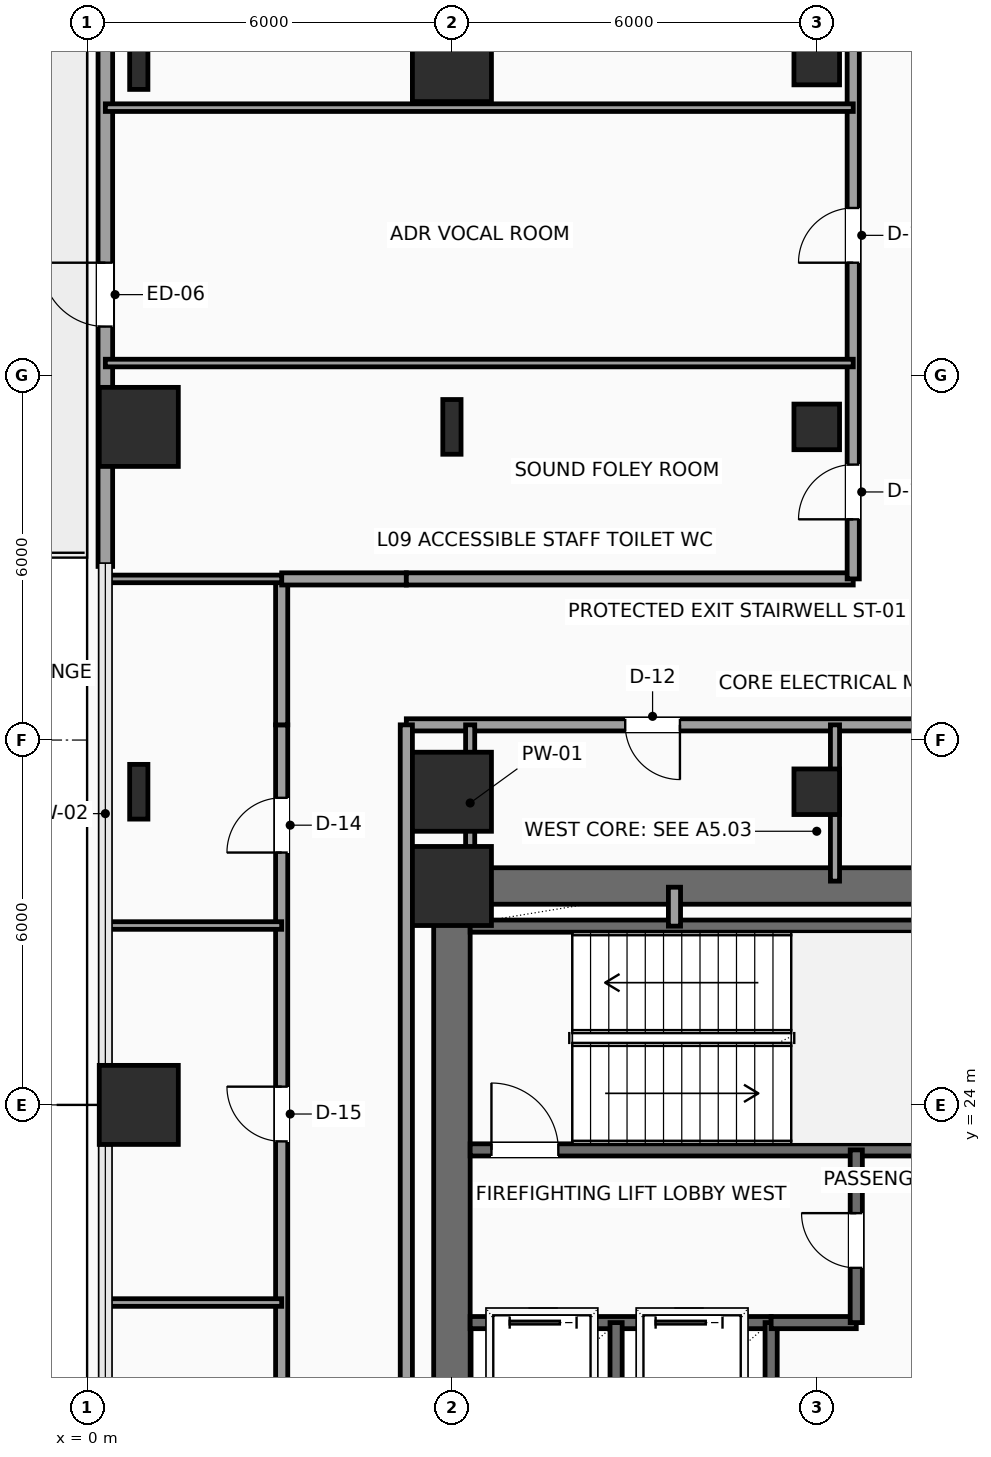
"""IFC4 building model, lengths in metres.
Left out: names, types, materials, properties, quantities, classifications, styles, units other than length and angle.
Written with IfcOpenShell. Run it as: python <this file> out.ifc"""

import sys

from ifc_helpers import new_model, si_unit, direction, frame, frame_2d, origin, origin_2d, place, context, subcontext, project, spatial, rectangle, hollow_rectangle, i_section, extrude, element, fill, save


model = new_model("IFC4")
c1 = context("Model", 3, precision=1e-05, world=origin(), true_north=direction((0.0, 1.0)))
c2 = subcontext(c1, "Body", "Model", "MODEL_VIEW")
j1 = project(units=[si_unit("LENGTHUNIT", "METRE"), si_unit("PLANEANGLEUNIT", "RADIAN")], contexts=[c1])
p1 = place(None, origin())
s1 = spatial("IfcSite", under=j1, at=p1, CompositionType="ELEMENT")
p2 = place(p1, origin())
s2 = spatial("IfcBuilding", under=s1, at=p2, CompositionType="ELEMENT")
p3 = place(p2, frame((0.0, 0.0, 44.1)))
s3 = spatial("IfcBuildingStorey", under=s2, at=p3, CompositionType="ELEMENT", Elevation=44.1)
for number, where, z_axis, x_axis in (
    (1, (6.0, 27.6, 0.0), (0.0, 0.0, 1.0), (1.0, 0.0, 0.0)),
    (2, (0.85, 24.0, 0.0), (0.0, 0.0, 1.0), (1.0, 0.0, 0.0)),
):
    element("IfcColumn", number, at=place(p3, frame(where, z_axis=z_axis, x_axis=x_axis)), inside=s3, PredefinedType="COLUMN", context=c2, shape_type="SweptSolid", body=[
        extrude(rectangle(XDim=1.3, YDim=1.3, at=origin_2d()), origin(), (0.0, 0.0, 1.0), 3.9),
    ])
p4 = place(p3, frame((0.85, 29.15, 0.0), z_axis=(0.0, 0.0, 1.0), x_axis=(1.0, 0.0, 0.0)))
e3 = element("IfcColumn", 3, at=p4, inside=s3, PredefinedType="COLUMN", context=c2, shape_type="SweptSolid", body=[
    extrude(i_section(OverallWidth=0.3, OverallDepth=0.9, WebThickness=0.019, FlangeThickness=0.035, FilletRadius=0.03, at=origin_2d()), origin(), (0.0, 0.0, 1.0), 3.9),
])
p5 = place(p3, frame((0.85, 35.15, 0.0), z_axis=(0.0, 0.0, 1.0), x_axis=(1.0, 0.0, 0.0)))
e4 = element("IfcColumn", 4, at=p5, inside=s3, PredefinedType="COLUMN", context=c2, shape_type="SweptSolid", body=[
    extrude(rectangle(XDim=1.3, YDim=1.3, at=origin_2d()), origin(), (0.0, 0.0, 1.0), 3.9),
])
p6 = place(p3, frame((0.85, 41.15, 0.0), z_axis=(0.0, 0.0, 1.0), x_axis=(1.0, 0.0, 0.0)))
e5 = element("IfcColumn", 5, at=p6, inside=s3, PredefinedType="COLUMN", context=c2, shape_type="SweptSolid", body=[
    extrude(i_section(OverallWidth=0.3, OverallDepth=0.9, WebThickness=0.019, FlangeThickness=0.035, FilletRadius=0.03, at=origin_2d()), origin(), (0.0, 0.0, 1.0), 3.9),
])
p7 = place(p3, frame((6.0, 29.15, 0.0), z_axis=(0.0, 0.0, 1.0), x_axis=(1.0, 0.0, 0.0)))
e6 = element("IfcColumn", 6, at=p7, inside=s3, PredefinedType="COLUMN", context=c2, shape_type="SweptSolid", body=[
    extrude(rectangle(XDim=1.3, YDim=1.3, at=origin_2d()), origin(), (0.0, 0.0, 1.0), 3.9),
])
p8 = place(p3, frame((6.0, 35.15, 0.0), z_axis=(0.0, 0.0, 1.0), x_axis=(1.0, 0.0, 0.0)))
e7 = element("IfcColumn", 7, at=p8, inside=s3, PredefinedType="COLUMN", context=c2, shape_type="SweptSolid", body=[
    extrude(i_section(OverallWidth=0.3, OverallDepth=0.9, WebThickness=0.019, FlangeThickness=0.035, FilletRadius=0.03, at=origin_2d()), origin(), (0.0, 0.0, 1.0), 3.9),
])
p9 = place(p3, frame((6.0, 41.15, 0.0), z_axis=(0.0, 0.0, 1.0), x_axis=(1.0, 0.0, 0.0)))
e8 = element("IfcColumn", 8, at=p9, inside=s3, PredefinedType="COLUMN", context=c2, shape_type="SweptSolid", body=[
    extrude(rectangle(XDim=1.3, YDim=1.3, at=origin_2d()), origin(), (0.0, 0.0, 1.0), 3.9),
])
for number, where, z_axis, x_axis in (
    (9, (12.0, 29.15, 0.0), (0.0, 0.0, 1.0), (1.0, 0.0, 0.0)),
    (10, (12.0, 35.15, 0.0), (0.0, 0.0, 1.0), (1.0, 0.0, 0.0)),
    (11, (12.0, 41.15, 0.0), (0.0, 0.0, 1.0), (1.0, 0.0, 0.0)),
):
    element("IfcColumn", number, at=place(p3, frame(where, z_axis=z_axis, x_axis=x_axis)), inside=s3, PredefinedType="COLUMN", context=c2, shape_type="SweptSolid", body=[
        extrude(hollow_rectangle(XDim=0.75, YDim=0.75, WallThickness=0.035, InnerFilletRadius=0.035, OuterFilletRadius=0.05, at=origin_2d()), origin(), (0.0, 0.0, 1.0), 3.9),
    ])
p10 = place(p3, frame((0.3, 32.855, 0.0), z_axis=(0.0, 0.0, 1.0), x_axis=(0.0, 1.0, 0.0)))
e12 = element("IfcWall", 12, at=p10, inside=s3, PredefinedType="SOLIDWALL", context=c2, shape_type="SweptSolid", body=[
    extrude(rectangle(XDim=9.29, YDim=0.24, at=frame_2d((4.645, 0.0))), origin(), (0.0, 0.0, 1.0), 3.65),
])
p11 = place(p10, frame((3.945, 0.0, 0.0)))
e13 = element("IfcOpeningElement", 13, at=p11, cuts=e12, PredefinedType="OPENING", context=c2, shape_type="SweptSolid", body=[
    extrude(rectangle(XDim=1.05, YDim=2.2, at=frame_2d((0.525, 1.1))), frame((0.0, 0.13, 0.0), z_axis=(0.0, -1.0, 0.0), x_axis=(1.0, 0.0, 0.0)), (0.0, 0.0, 1.0), 0.26),
])
p12 = place(p3, frame((6.0, 27.6, 0.0), z_axis=(0.0, 0.0, 1.0), x_axis=(1.0, 0.0, 0.0)))
e14 = element("IfcWall", 14, at=p12, inside=s3, PredefinedType="SHEAR", context=c2, shape_type="SweptSolid", body=[
    extrude(rectangle(XDim=12.0, YDim=0.6, at=frame_2d((6.0, 0.0))), origin(), (0.0, 0.0, 1.0), 3.65),
])
p13 = place(p12, frame((10.2, 0.0, 0.0)))
e15 = element("IfcOpeningElement", 15, at=p13, cuts=e14, PredefinedType="OPENING", context=c2, shape_type="SweptSolid", body=[
    extrude(rectangle(XDim=0.9, YDim=2.15, at=frame_2d((0.45, 1.075))), frame((0.0, 0.31, 0.0), z_axis=(0.0, -1.0, 0.0), x_axis=(1.0, 0.0, 0.0)), (0.0, 0.0, 1.0), 0.62),
])
p14 = place(p3, frame((6.0, 18.0, 0.0), z_axis=(0.0, 0.0, 1.0), x_axis=(0.0, 1.0, 0.0)))
e16 = element("IfcWall", 16, at=p14, inside=s3, PredefinedType="SHEAR", context=c2, shape_type="SweptSolid", body=[
    extrude(rectangle(XDim=9.6, YDim=0.6, at=frame_2d((4.8, 0.0))), origin(), (0.0, 0.0, 1.0), 3.65),
])
p15 = place(p3, frame((6.3, 23.26, 0.0), z_axis=(0.0, 0.0, 1.0), x_axis=(1.0, 0.0, 0.0)))
e17 = element("IfcWall", 17, at=p15, inside=s3, PredefinedType="SHEAR", context=c2, shape_type="SweptSolid", body=[
    extrude(rectangle(XDim=8.88, YDim=0.2, at=frame_2d((4.44, 0.0))), origin(), (0.0, 0.0, 1.0), 3.65),
])
p16 = place(p15, frame((0.35, 0.0, 0.0)))
e18 = element("IfcOpeningElement", 18, at=p16, cuts=e17, PredefinedType="OPENING", context=c2, shape_type="SweptSolid", body=[
    extrude(rectangle(XDim=1.1, YDim=2.2, at=frame_2d((0.55, 1.1))), frame((0.0, 0.11, 0.0), z_axis=(0.0, -1.0, 0.0), x_axis=(1.0, 0.0, 0.0)), (0.0, 0.0, 1.0), 0.22),
])
p17 = place(p3, frame((6.3, 26.94, 0.0), z_axis=(0.0, 0.0, 1.0), x_axis=(1.0, 0.0, 0.0)))
e19 = element("IfcWall", 19, at=p17, inside=s3, PredefinedType="SHEAR", context=c2, shape_type="SweptSolid", body=[
    extrude(rectangle(XDim=8.88, YDim=0.2, at=frame_2d((4.44, 0.0))), origin(), (0.0, 0.0, 1.0), 3.65),
])
p18 = place(p3, frame((6.3, 20.42, 0.0), z_axis=(0.0, 0.0, 1.0), x_axis=(1.0, 0.0, 0.0)))
e20 = element("IfcWall", 20, at=p18, inside=s3, PredefinedType="SHEAR", context=c2, shape_type="SweptSolid", body=[
    extrude(rectangle(XDim=4.95, YDim=0.2, at=frame_2d((2.475, 0.0))), origin(), (0.0, 0.0, 1.0), 3.65),
])
p19 = place(p18, frame((0.65, 0.0, 0.0)))
e21 = element("IfcOpeningElement", 21, at=p19, cuts=e20, PredefinedType="OPENING", context=c2, shape_type="SweptSolid", body=[
    extrude(rectangle(XDim=1.1, YDim=2.2, at=frame_2d((0.55, 1.1))), frame((0.0, 0.11, 0.0), z_axis=(0.0, -1.0, 0.0), x_axis=(1.0, 0.0, 0.0)), (0.0, 0.0, 1.0), 0.22),
])
p20 = place(p18, frame((3.05, 0.0, 0.0)))
e22 = element("IfcOpeningElement", 22, at=p20, cuts=e20, PredefinedType="OPENING", context=c2, shape_type="SweptSolid", body=[
    extrude(rectangle(XDim=1.1, YDim=2.2, at=frame_2d((0.55, 1.1))), frame((0.0, 0.11, 0.0), z_axis=(0.0, -1.0, 0.0), x_axis=(1.0, 0.0, 0.0)), (0.0, 0.0, 1.0), 0.22),
])
for number, where, z_axis, x_axis in (
    (23, (8.7, 18.25, 0.0), (0.0, 0.0, 1.0), (0.0, 1.0, 0.0)),
    (24, (11.25, 18.25, 0.0), (0.0, 0.0, 1.0), (0.0, 1.0, 0.0)),
):
    element("IfcWall", number, at=place(p3, frame(where, z_axis=z_axis, x_axis=x_axis)), inside=s3, PredefinedType="SHEAR", context=c2, shape_type="SweptSolid", body=[
        extrude(rectangle(XDim=2.17, YDim=0.2, at=frame_2d((1.085, 0.0))), origin(), (0.0, 0.0, 1.0), 3.65),
    ])
p21 = place(p3, frame((11.25, 20.42, 0.0), z_axis=(0.0, 0.0, 1.0), x_axis=(1.0, 0.0, 0.0)))
e25 = element("IfcWall", 25, at=p21, inside=s3, PredefinedType="SHEAR", context=c2, shape_type="SweptSolid", body=[
    extrude(rectangle(XDim=1.4, YDim=0.2, at=frame_2d((0.7, 0.0))), origin(), (0.0, 0.0, 1.0), 3.65),
])
p22 = place(p3, frame((12.65, 20.42, 0.0), z_axis=(0.0, 0.0, 1.0), x_axis=(0.0, 1.0, 0.0)))
e26 = element("IfcWall", 26, at=p22, inside=s3, PredefinedType="SHEAR", context=c2, shape_type="SweptSolid", body=[
    extrude(rectangle(XDim=2.84, YDim=0.2, at=frame_2d((1.42, 0.0))), origin(), (0.0, 0.0, 1.0), 3.65),
])
p23 = place(p22, frame((0.9, 0.0, 0.0)))
e27 = element("IfcOpeningElement", 27, at=p23, cuts=e26, PredefinedType="OPENING", context=c2, shape_type="SweptSolid", body=[
    extrude(rectangle(XDim=0.9, YDim=2.15, at=frame_2d((0.45, 1.075))), frame((0.0, 0.11, 0.0), z_axis=(0.0, -1.0, 0.0), x_axis=(1.0, 0.0, 0.0)), (0.0, 0.0, 1.0), 0.22),
])
p24 = place(p3, frame((9.66, 26.94, 0.0), z_axis=(0.0, 0.0, 1.0), x_axis=(0.0, 1.0, 0.0)))
e28 = element("IfcWall", 28, at=p24, inside=s3, PredefinedType="SOLIDWALL", context=c2, shape_type="SweptSolid", body=[
    extrude(rectangle(XDim=0.64, YDim=0.2, at=frame_2d((0.32, 0.0))), origin(), (0.0, 0.0, 1.0), 3.65),
])
p25 = place(p3, frame((3.2, 14.55, 0.0), z_axis=(0.0, 0.0, 1.0), x_axis=(0.0, 1.0, 0.0)))
e29 = element("IfcWall", 29, at=p25, inside=s3, PredefinedType="PARTITIONING", context=c2, shape_type="SweptSolid", body=[
    extrude(rectangle(XDim=15.7, YDim=0.2, at=frame_2d((7.85, 0.0))), origin(), (0.0, 0.0, 1.0), 3.65),
])
p26 = place(p25, frame((2.65, 0.0, 0.0)))
e30 = element("IfcOpeningElement", 30, at=p26, cuts=e29, PredefinedType="OPENING", context=c2, shape_type="SweptSolid", body=[
    extrude(rectangle(XDim=0.9, YDim=2.1, at=frame_2d((0.45, 1.05))), frame((0.0, 0.11, 0.0), z_axis=(0.0, -1.0, 0.0), x_axis=(1.0, 0.0, 0.0)), (0.0, 0.0, 1.0), 0.22),
])
p27 = place(p25, frame((8.85, 0.0, 0.0)))
e31 = element("IfcOpeningElement", 31, at=p27, cuts=e29, PredefinedType="OPENING", context=c2, shape_type="SweptSolid", body=[
    extrude(rectangle(XDim=0.9, YDim=2.1, at=frame_2d((0.45, 1.05))), frame((0.0, 0.11, 0.0), z_axis=(0.0, -1.0, 0.0), x_axis=(1.0, 0.0, 0.0)), (0.0, 0.0, 1.0), 0.22),
])
p28 = place(p25, frame((13.6, 0.0, 0.0)))
e32 = element("IfcOpeningElement", 32, at=p28, cuts=e29, PredefinedType="OPENING", context=c2, shape_type="SweptSolid", body=[
    extrude(rectangle(XDim=0.9, YDim=2.1, at=frame_2d((0.45, 1.05))), frame((0.0, 0.11, 0.0), z_axis=(0.0, -1.0, 0.0), x_axis=(1.0, 0.0, 0.0)), (0.0, 0.0, 1.0), 0.22),
])
p29 = place(p3, frame((3.2, 30.25, 0.0), z_axis=(0.0, 0.0, 1.0), x_axis=(0.0, 1.0, 0.0)))
e33 = element("IfcWall", 33, at=p29, inside=s3, PredefinedType="PARTITIONING", context=c2, shape_type="SweptSolid", body=[
    extrude(rectangle(XDim=2.4, YDim=0.2, at=frame_2d((1.2, 0.0))), origin(), (0.0, 0.0, 1.0), 3.65),
])
p30 = place(p3, frame((3.2, 32.65, 0.0), z_axis=(0.0, 0.0, 1.0), x_axis=(1.0, 0.0, 0.0)))
e34 = element("IfcWall", 34, at=p30, inside=s3, PredefinedType="PARTITIONING", context=c2, shape_type="SweptSolid", body=[
    extrude(rectangle(XDim=2.05, YDim=0.2, at=frame_2d((1.025, 0.0))), origin(), (0.0, 0.0, 1.0), 3.65),
])
p31 = place(p3, frame((5.25, 32.65, 0.0), z_axis=(0.0, 0.0, 1.0), x_axis=(1.0, 0.0, 0.0)))
e35 = element("IfcWall", 35, at=p31, inside=s3, PredefinedType="PARTITIONING", context=c2, shape_type="SweptSolid", body=[
    extrude(rectangle(XDim=7.35, YDim=0.2, at=frame_2d((3.675, 0.0))), origin(), (0.0, 0.0, 1.0), 3.65),
])
p32 = place(p3, frame((12.6, 32.65, 0.0), z_axis=(0.0, 0.0, 1.0), x_axis=(0.0, 1.0, 0.0)))
e36 = element("IfcWall", 36, at=p32, inside=s3, PredefinedType="PARTITIONING", context=c2, shape_type="SweptSolid", body=[
    extrude(rectangle(XDim=12.25, YDim=0.2, at=frame_2d((6.125, 0.0))), origin(), (0.0, 0.0, 1.0), 3.65),
])
p33 = place(p32, frame((0.98, 0.0, 0.0)))
e37 = element("IfcOpeningElement", 37, at=p33, cuts=e36, PredefinedType="OPENING", context=c2, shape_type="SweptSolid", body=[
    extrude(rectangle(XDim=0.9, YDim=2.1, at=frame_2d((0.45, 1.05))), frame((0.0, 0.11, 0.0), z_axis=(0.0, -1.0, 0.0), x_axis=(1.0, 0.0, 0.0)), (0.0, 0.0, 1.0), 0.22),
])
p34 = place(p32, frame((5.2, 0.0, 0.0)))
e38 = element("IfcOpeningElement", 38, at=p34, cuts=e36, PredefinedType="OPENING", context=c2, shape_type="SweptSolid", body=[
    extrude(rectangle(XDim=0.9, YDim=2.1, at=frame_2d((0.45, 1.05))), frame((0.0, 0.11, 0.0), z_axis=(0.0, -1.0, 0.0), x_axis=(1.0, 0.0, 0.0)), (0.0, 0.0, 1.0), 0.22),
])
p35 = place(p32, frame((9.55, 0.0, 0.0)))
e39 = element("IfcOpeningElement", 39, at=p35, cuts=e36, PredefinedType="OPENING", context=c2, shape_type="SweptSolid", body=[
    extrude(rectangle(XDim=0.9, YDim=2.1, at=frame_2d((0.45, 1.05))), frame((0.0, 0.11, 0.0), z_axis=(0.0, -1.0, 0.0), x_axis=(1.0, 0.0, 0.0)), (0.0, 0.0, 1.0), 0.22),
])
p36 = place(p3, frame((15.88, 30.25, 0.0), z_axis=(0.0, 0.0, 1.0), x_axis=(-1.0, 0.0, 0.0)))
e40 = element("IfcWall", 40, at=p36, inside=s3, PredefinedType="PARTITIONING", context=c2, shape_type="SweptSolid", body=[
    extrude(rectangle(XDim=10.63, YDim=0.2, at=frame_2d((5.315, 0.0))), origin(), (0.0, 0.0, 1.0), 3.65),
])
p37 = place(p36, frame((6.13, 0.0, 0.0)))
e41 = element("IfcOpeningElement", 41, at=p37, cuts=e40, PredefinedType="OPENING", context=c2, shape_type="SweptSolid", body=[
    extrude(rectangle(XDim=0.9, YDim=2.1, at=frame_2d((0.45, 1.05))), frame((0.0, 0.11, 0.0), z_axis=(0.0, -1.0, 0.0), x_axis=(1.0, 0.0, 0.0)), (0.0, 0.0, 1.0), 0.22),
])
p38 = place(p3, frame((5.25, 30.25, 0.0), z_axis=(0.0, 0.0, 1.0), x_axis=(0.0, -1.0, 0.0)))
e42 = element("IfcWall", 42, at=p38, inside=s3, PredefinedType="PARTITIONING", context=c2, shape_type="SweptSolid", body=[
    extrude(rectangle(XDim=13.35, YDim=0.2, at=frame_2d((6.675, 0.0))), origin(), (0.0, 0.0, 1.0), 3.65),
])
for number, where, z_axis, x_axis in (
    (43, (6.3, 27.68, 0.0), (0.0, 0.0, 1.0), (0.0, 1.0, 0.0)),
    (44, (12.3, 27.68, 0.0), (0.0, 0.0, 1.0), (0.0, 1.0, 0.0)),
):
    element("IfcWall", number, at=place(p3, frame(where, z_axis=z_axis, x_axis=x_axis)), inside=s3, PredefinedType="PARTITIONING", context=c2, shape_type="SweptSolid", body=[
        extrude(rectangle(XDim=2.57, YDim=0.15, at=frame_2d((1.285, 0.0))), origin(), (0.0, 0.0, 1.0), 2.992),
    ])
for number, where, z_axis, x_axis in (
    (45, (0.3, 36.2, 0.0), (0.0, 0.0, 1.0), (1.0, 0.0, 0.0)),
    (46, (0.3, 40.4, 0.0), (0.0, 0.0, 1.0), (1.0, 0.0, 0.0)),
):
    element("IfcWall", number, at=place(p3, frame(where, z_axis=z_axis, x_axis=x_axis)), inside=s3, PredefinedType="PARTITIONING", context=c2, shape_type="SweptSolid", body=[
        extrude(rectangle(XDim=12.3, YDim=0.125, at=frame_2d((6.15, 0.0))), origin(), (0.0, 0.0, 1.0), 3.65),
    ])
for number, where, z_axis, x_axis in (
    (47, (0.3, 20.75, 0.0), (0.0, 0.0, 1.0), (1.0, 0.0, 0.0)),
    (48, (0.3, 26.95, 0.0), (0.0, 0.0, 1.0), (1.0, 0.0, 0.0)),
    (49, (0.3, 32.65, 0.0), (0.0, 0.0, 1.0), (1.0, 0.0, 0.0)),
):
    element("IfcWall", number, at=place(p3, frame(where, z_axis=z_axis, x_axis=x_axis)), inside=s3, PredefinedType="PARTITIONING", context=c2, shape_type="SweptSolid", body=[
        extrude(rectangle(XDim=2.9, YDim=0.125, at=frame_2d((1.45, 0.0))), origin(), (0.0, 0.0, 1.0), 3.65),
    ])
p39 = place(p11, origin())
e50 = element("IfcDoor", 50, at=p39, inside=s3, OperationType="SINGLE_SWING_RIGHT", PredefinedType="DOOR", context=c2, shape_type="SweptSolid", body=[
    extrude(rectangle(XDim=1.05, YDim=2.2, at=frame_2d((0.525, 1.1))), frame((0.0, 0.025, 0.0), z_axis=(0.0, -1.0, 0.0), x_axis=(1.0, 0.0, 0.0)), (0.0, 0.0, 1.0), 0.05),
])
fill(e13, e50)
p40 = place(p16, origin())
e51 = element("IfcDoor", 51, at=p40, inside=s3, OperationType="SINGLE_SWING_LEFT", PredefinedType="DOOR", context=c2, shape_type="SweptSolid", body=[
    extrude(rectangle(XDim=1.1, YDim=2.2, at=frame_2d((0.55, 1.1))), frame((0.0, 0.025, 0.0), z_axis=(0.0, -1.0, 0.0), x_axis=(1.0, 0.0, 0.0)), (0.0, 0.0, 1.0), 0.05),
])
fill(e18, e51)
p41 = place(p19, origin())
e52 = element("IfcDoor", 52, at=p41, inside=s3, OperationType="SLIDING_TO_LEFT", PredefinedType="DOOR", context=c2, shape_type="SweptSolid", body=[
    extrude(rectangle(XDim=1.1, YDim=2.2, at=frame_2d((0.55, 1.1))), frame((0.0, 0.025, 0.0), z_axis=(0.0, -1.0, 0.0), x_axis=(1.0, 0.0, 0.0)), (0.0, 0.0, 1.0), 0.05),
])
fill(e21, e52)
p42 = place(p20, origin())
e53 = element("IfcDoor", 53, at=p42, inside=s3, OperationType="SLIDING_TO_LEFT", PredefinedType="DOOR", context=c2, shape_type="SweptSolid", body=[
    extrude(rectangle(XDim=1.1, YDim=2.2, at=frame_2d((0.55, 1.1))), frame((0.0, 0.025, 0.0), z_axis=(0.0, -1.0, 0.0), x_axis=(1.0, 0.0, 0.0)), (0.0, 0.0, 1.0), 0.05),
])
fill(e22, e53)
p43 = place(p23, origin())
e54 = element("IfcDoor", 54, at=p43, inside=s3, OperationType="SINGLE_SWING_RIGHT", PredefinedType="DOOR", context=c2, shape_type="SweptSolid", body=[
    extrude(rectangle(XDim=0.9, YDim=2.15, at=frame_2d((0.45, 1.075))), frame((0.0, 0.025, 0.0), z_axis=(0.0, -1.0, 0.0), x_axis=(1.0, 0.0, 0.0)), (0.0, 0.0, 1.0), 0.05),
])
fill(e27, e54)
p44 = place(p27, origin())
e55 = element("IfcDoor", 55, at=p44, inside=s3, OperationType="SINGLE_SWING_RIGHT", PredefinedType="DOOR", context=c2, shape_type="SweptSolid", body=[
    extrude(rectangle(XDim=0.9, YDim=2.1, at=frame_2d((0.45, 1.05))), frame((0.0, 0.025, 0.0), z_axis=(0.0, -1.0, 0.0), x_axis=(1.0, 0.0, 0.0)), (0.0, 0.0, 1.0), 0.05),
])
fill(e31, e55)
p45 = place(p28, origin())
e56 = element("IfcDoor", 56, at=p45, inside=s3, OperationType="SINGLE_SWING_LEFT", PredefinedType="DOOR", context=c2, shape_type="SweptSolid", body=[
    extrude(rectangle(XDim=0.9, YDim=2.1, at=frame_2d((0.45, 1.05))), frame((0.0, 0.025, 0.0), z_axis=(0.0, -1.0, 0.0), x_axis=(1.0, 0.0, 0.0)), (0.0, 0.0, 1.0), 0.05),
])
fill(e32, e56)
p46 = place(p33, origin())
e57 = element("IfcDoor", 57, at=p46, inside=s3, OperationType="SINGLE_SWING_LEFT", PredefinedType="DOOR", context=c2, shape_type="SweptSolid", body=[
    extrude(rectangle(XDim=0.9, YDim=2.1, at=frame_2d((0.45, 1.05))), frame((0.0, 0.025, 0.0), z_axis=(0.0, -1.0, 0.0), x_axis=(1.0, 0.0, 0.0)), (0.0, 0.0, 1.0), 0.05),
])
fill(e37, e57)
p47 = place(p34, origin())
e58 = element("IfcDoor", 58, at=p47, inside=s3, OperationType="SINGLE_SWING_LEFT", PredefinedType="DOOR", context=c2, shape_type="SweptSolid", body=[
    extrude(rectangle(XDim=0.9, YDim=2.1, at=frame_2d((0.45, 1.05))), frame((0.0, 0.025, 0.0), z_axis=(0.0, -1.0, 0.0), x_axis=(1.0, 0.0, 0.0)), (0.0, 0.0, 1.0), 0.05),
])
fill(e38, e58)
p48 = place(p37, origin())
e59 = element("IfcDoor", 59, at=p48, inside=s3, OperationType="SINGLE_SWING_LEFT", PredefinedType="DOOR", context=c2, shape_type="SweptSolid", body=[
    extrude(rectangle(XDim=0.9, YDim=2.1, at=frame_2d((0.45, 1.05))), frame((0.0, 0.025, 0.0), z_axis=(0.0, -1.0, 0.0), x_axis=(1.0, 0.0, 0.0)), (0.0, 0.0, 1.0), 0.05),
])
fill(e41, e59)
save(model, sys.argv[1])
